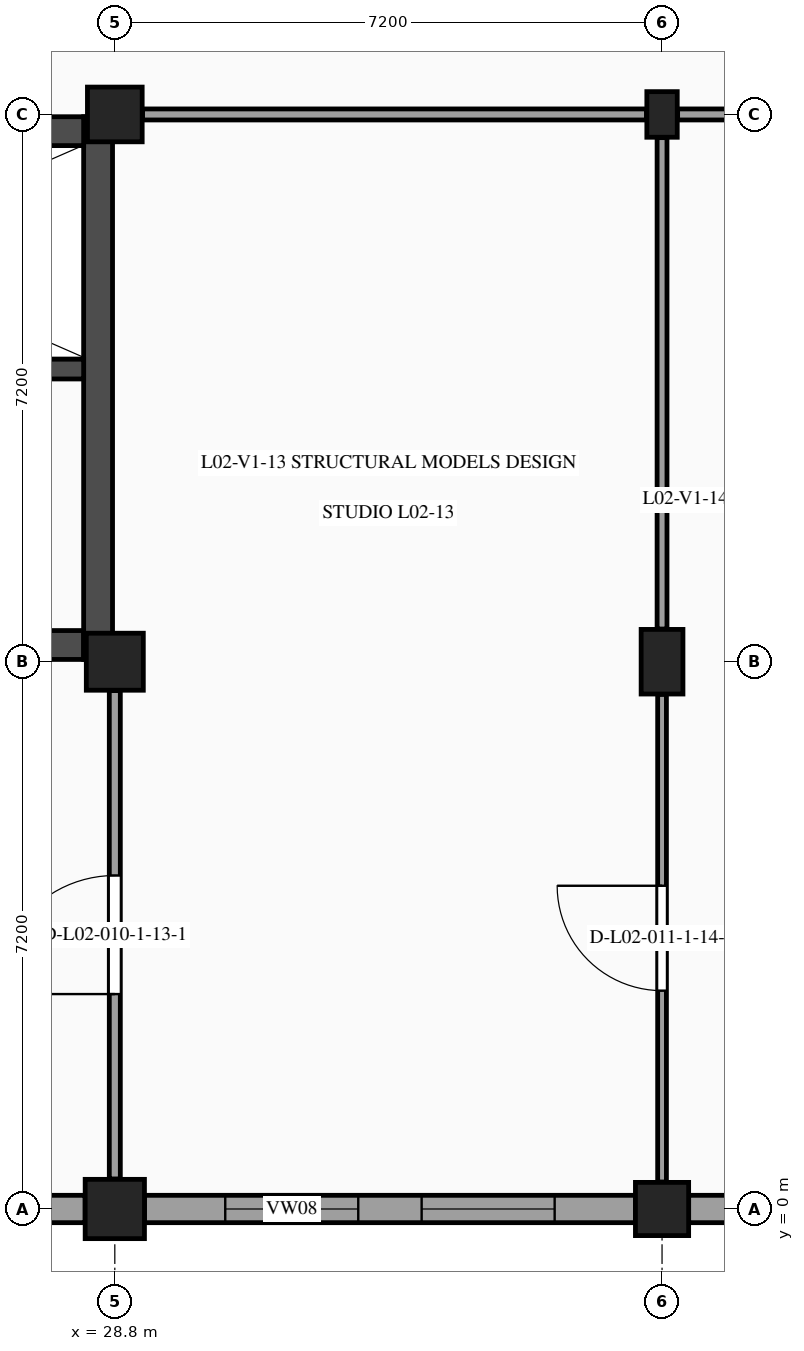
"""IFC4 building model, lengths in metres.
Left out: names, types, materials, properties, quantities, classifications, styles, units other than length and angle.
Written with IfcOpenShell. Run it as: python <this file> out.ifc"""

import sys

from ifc_helpers import new_model, si_unit, direction, frame, frame_2d, origin, origin_2d, place, context, subcontext, project, spatial, rectangle, extrude, element, fill, save


model = new_model("IFC4")
c1 = context("Model", 3, precision=1e-05, world=origin(), true_north=direction((0.0, 1.0)))
c2 = subcontext(c1, "Body", "Model", "MODEL_VIEW")
j1 = project(units=[si_unit("LENGTHUNIT", "METRE"), si_unit("PLANEANGLEUNIT", "RADIAN")], contexts=[c1])
p1 = place(None, origin())
s1 = spatial("IfcSite", under=j1, at=p1, CompositionType="ELEMENT")
p2 = place(p1, origin())
s2 = spatial("IfcBuilding", under=s1, at=p2, CompositionType="ELEMENT")
p3 = place(p2, frame((0.0, 0.0, 9.9)))
s3 = spatial("IfcBuildingStorey", under=s2, at=p3, CompositionType="ELEMENT", Elevation=9.9)
p4 = place(p3, frame((28.8, 0.0, 0.0), z_axis=(0.0, 0.0, 1.0), x_axis=(1.0, 0.0, 0.0)))
e1 = element("IfcColumn", 1, at=p4, inside=s3, PredefinedType="COLUMN", context=c2, shape_type="SweptSolid", body=[
    extrude(rectangle(XDim=0.78, YDim=0.78, at=origin_2d()), origin(), (0.0, 0.0, 1.0), 4.5),
])
p5 = place(p3, frame((28.8, 7.2, 0.0), z_axis=(0.0, 0.0, 1.0), x_axis=(1.0, 0.0, 0.0)))
e2 = element("IfcColumn", 2, at=p5, inside=s3, PredefinedType="COLUMN", context=c2, shape_type="SweptSolid", body=[
    extrude(rectangle(XDim=0.75, YDim=0.75, at=origin_2d()), origin(), (0.0, 0.0, 1.0), 4.5),
])
p6 = place(p3, frame((28.8, 14.4, 0.0), z_axis=(0.0, 0.0, 1.0), x_axis=(1.0, 0.0, 0.0)))
e3 = element("IfcColumn", 3, at=p6, inside=s3, PredefinedType="COLUMN", context=c2, shape_type="SweptSolid", body=[
    extrude(rectangle(XDim=0.72, YDim=0.72, at=origin_2d()), origin(), (0.0, 0.0, 1.0), 4.5),
])
p7 = place(p3, frame((36.0, 0.0, 0.0), z_axis=(0.0, 0.0, 1.0), x_axis=(1.0, 0.0, 0.0)))
e4 = element("IfcColumn", 4, at=p7, inside=s3, PredefinedType="COLUMN", context=c2, shape_type="SweptSolid", body=[
    extrude(rectangle(XDim=0.7, YDim=0.7, at=origin_2d()), origin(), (0.0, 0.0, 1.0), 4.5),
])
p8 = place(p3, frame((36.0, 7.2, 0.0), z_axis=(0.0, 0.0, 1.0), x_axis=(1.0, 0.0, 0.0)))
e5 = element("IfcColumn", 5, at=p8, inside=s3, PredefinedType="COLUMN", context=c2, shape_type="SweptSolid", body=[
    extrude(rectangle(XDim=0.55, YDim=0.85, at=origin_2d()), origin(), (0.0, 0.0, 1.0), 4.5),
])
p9 = place(p3, frame((36.0, 14.4, 0.0), z_axis=(0.0, 0.0, 1.0), x_axis=(1.0, 0.0, 0.0)))
e6 = element("IfcColumn", 6, at=p9, inside=s3, PredefinedType="PILASTER", context=c2, shape_type="SweptSolid", body=[
    extrude(rectangle(XDim=0.4, YDim=0.6, at=origin_2d()), origin(), (0.0, 0.0, 1.0), 4.5),
])
p10 = place(p3, frame((42.81, 0.0, 0.0), z_axis=(0.0, 0.0, 1.0), x_axis=(-1.0, 0.0, 0.0)))
e7 = element("IfcWall", 7, at=p10, inside=s3, PredefinedType="STANDARD", context=c2, shape_type="SweptSolid", body=[
    extrude(rectangle(XDim=6.46, YDim=0.36, at=frame_2d((3.23, 0.0))), origin(), (0.0, 0.0, 1.0), 3.46),
])
p11 = place(p10, frame((0.963, 0.0, 1.15)))
e8 = element("IfcOpeningElement", 8, at=p11, cuts=e7, PredefinedType="OPENING", context=c2, shape_type="SweptSolid", body=[
    extrude(rectangle(XDim=1.95, YDim=1.4, at=frame_2d((0.975, 0.7))), frame((0.0, 0.19, 0.0), z_axis=(0.0, -1.0, 0.0), x_axis=(1.0, 0.0, 0.0)), (0.0, 0.0, 1.0), 0.38),
])
p12 = place(p10, frame((3.547, 0.0, 1.15)))
e9 = element("IfcOpeningElement", 9, at=p12, cuts=e7, PredefinedType="OPENING", context=c2, shape_type="SweptSolid", body=[
    extrude(rectangle(XDim=1.95, YDim=1.4, at=frame_2d((0.975, 0.7))), frame((0.0, 0.19, 0.0), z_axis=(0.0, -1.0, 0.0), x_axis=(1.0, 0.0, 0.0)), (0.0, 0.0, 1.0), 0.38),
])
p13 = place(p3, frame((35.65, 0.0, 0.0), z_axis=(0.0, 0.0, 1.0), x_axis=(-1.0, 0.0, 0.0)))
e10 = element("IfcWall", 10, at=p13, inside=s3, PredefinedType="STANDARD", context=c2, shape_type="SweptSolid", body=[
    extrude(rectangle(XDim=6.46, YDim=0.36, at=frame_2d((3.23, 0.0))), origin(), (0.0, 0.0, 1.0), 3.47),
])
p14 = place(p13, frame((1.063, 0.0, 1.15)))
e11 = element("IfcOpeningElement", 11, at=p14, cuts=e10, PredefinedType="OPENING", context=c2, shape_type="SweptSolid", body=[
    extrude(rectangle(XDim=1.75, YDim=1.4, at=frame_2d((0.875, 0.7))), frame((0.0, 0.19, 0.0), z_axis=(0.0, -1.0, 0.0), x_axis=(1.0, 0.0, 0.0)), (0.0, 0.0, 1.0), 0.38),
])
p15 = place(p13, frame((3.647, 0.0, 1.15)))
e12 = element("IfcOpeningElement", 12, at=p15, cuts=e10, PredefinedType="OPENING", context=c2, shape_type="SweptSolid", body=[
    extrude(rectangle(XDim=1.75, YDim=1.4, at=frame_2d((0.875, 0.7))), frame((0.0, 0.19, 0.0), z_axis=(0.0, -1.0, 0.0), x_axis=(1.0, 0.0, 0.0)), (0.0, 0.0, 1.0), 0.38),
])
p16 = place(p3, frame((28.41, 0.0, 0.0), z_axis=(0.0, 0.0, 1.0), x_axis=(-1.0, 0.0, 0.0)))
e13 = element("IfcWall", 13, at=p16, inside=s3, PredefinedType="STANDARD", context=c2, shape_type="SweptSolid", body=[
    extrude(rectangle(XDim=6.46, YDim=0.36, at=frame_2d((3.23, 0.0))), origin(), (0.0, 0.0, 1.0), 3.47),
])
p17 = place(p16, frame((1.163, 0.0, 1.15)))
e14 = element("IfcOpeningElement", 14, at=p17, cuts=e13, PredefinedType="OPENING", context=c2, shape_type="SweptSolid", body=[
    extrude(rectangle(XDim=1.55, YDim=1.35, at=frame_2d((0.775, 0.675))), frame((0.0, 0.19, 0.0), z_axis=(0.0, -1.0, 0.0), x_axis=(1.0, 0.0, 0.0)), (0.0, 0.0, 1.0), 0.38),
])
p18 = place(p16, frame((3.747, 0.0, 1.15)))
e15 = element("IfcOpeningElement", 15, at=p18, cuts=e13, PredefinedType="OPENING", context=c2, shape_type="SweptSolid", body=[
    extrude(rectangle(XDim=1.55, YDim=1.35, at=frame_2d((0.775, 0.675))), frame((0.0, 0.19, 0.0), z_axis=(0.0, -1.0, 0.0), x_axis=(1.0, 0.0, 0.0)), (0.0, 0.0, 1.0), 0.38),
])
p19 = place(p3, frame((21.79, 7.42, 0.0), z_axis=(0.0, 0.0, 1.0), x_axis=(1.0, 0.0, 0.0)))
e16 = element("IfcWall", 16, at=p19, inside=s3, PredefinedType="SHEAR", context=c2, shape_type="SweptSolid", body=[
    extrude(rectangle(XDim=6.6, YDim=0.38, at=frame_2d((3.3, 0.0))), origin(), (0.0, 0.0, 1.0), 4.225),
])
p20 = place(p19, frame((2.22, 0.0, 0.0)))
e17 = element("IfcOpeningElement", 17, at=p20, cuts=e16, PredefinedType="OPENING", context=c2, shape_type="SweptSolid", body=[
    extrude(rectangle(XDim=1.8, YDim=2.2, at=frame_2d((0.9, 1.1))), frame((0.0, 0.2, 0.0), z_axis=(0.0, -1.0, 0.0), x_axis=(1.0, 0.0, 0.0)), (0.0, 0.0, 1.0), 0.4),
])
p21 = place(p3, frame((28.58, 7.23, 0.0), z_axis=(0.0, 0.0, 1.0), x_axis=(0.0, 1.0, 0.0)))
e18 = element("IfcWall", 18, at=p21, inside=s3, PredefinedType="SHEAR", context=c2, shape_type="SweptSolid", body=[
    extrude(rectangle(XDim=7.14, YDim=0.38, at=frame_2d((3.57, 0.0))), origin(), (0.0, 0.0, 1.0), 4.225),
])
p22 = place(p3, frame((21.79, 14.18, 0.0), z_axis=(0.0, 0.0, 1.0), x_axis=(1.0, 0.0, 0.0)))
e19 = element("IfcWall", 19, at=p22, inside=s3, PredefinedType="SHEAR", context=c2, shape_type="SweptSolid", body=[
    extrude(rectangle(XDim=6.6, YDim=0.38, at=frame_2d((3.3, 0.0))), origin(), (0.0, 0.0, 1.0), 4.225),
])
p23 = place(p3, frame((21.79, 11.05, 0.0), z_axis=(0.0, 0.0, 1.0), x_axis=(1.0, 0.0, 0.0)))
e20 = element("IfcWall", 20, at=p23, inside=s3, PredefinedType="SHEAR", context=c2, shape_type="SweptSolid", body=[
    extrude(rectangle(XDim=6.6, YDim=0.26, at=frame_2d((3.3, 0.0))), origin(), (0.0, 0.0, 1.0), 4.225),
])
p24 = place(p23, frame((0.95, 0.0, 0.0)))
e21 = element("IfcOpeningElement", 21, at=p24, cuts=e20, PredefinedType="OPENING", context=c2, shape_type="SweptSolid", body=[
    extrude(rectangle(XDim=1.1, YDim=2.2, at=frame_2d((0.55, 1.1))), frame((0.0, 0.14, 0.0), z_axis=(0.0, -1.0, 0.0), x_axis=(1.0, 0.0, 0.0)), (0.0, 0.0, 1.0), 0.28),
])
p25 = place(p23, frame((4.1, 0.0, 0.0)))
e22 = element("IfcOpeningElement", 22, at=p25, cuts=e20, PredefinedType="OPENING", context=c2, shape_type="SweptSolid", body=[
    extrude(rectangle(XDim=1.0, YDim=2.15, at=frame_2d((0.5, 1.075))), frame((0.0, 0.14, 0.0), z_axis=(0.0, -1.0, 0.0), x_axis=(1.0, 0.0, 0.0)), (0.0, 0.0, 1.0), 0.28),
])
p26 = place(p3, frame((28.8, 0.395, 0.0), z_axis=(0.0, 0.0, 1.0), x_axis=(0.0, 1.0, 0.0)))
e23 = element("IfcWall", 23, at=p26, inside=s3, PredefinedType="PARTITIONING", context=c2, shape_type="SweptSolid", body=[
    extrude(rectangle(XDim=6.425, YDim=0.145, at=frame_2d((3.212, 0.0))), origin(), (0.0, 0.0, 1.0), 3.54),
])
p27 = place(p26, frame((2.433, 0.0, 0.0)))
e24 = element("IfcOpeningElement", 24, at=p27, cuts=e23, PredefinedType="OPENING", context=c2, shape_type="SweptSolid", body=[
    extrude(rectangle(XDim=1.56, YDim=2.25, at=frame_2d((0.78, 1.125))), frame((0.0, 0.083, 0.0), z_axis=(0.0, -1.0, 0.0), x_axis=(1.0, 0.0, 0.0)), (0.0, 0.0, 1.0), 0.165),
])
p28 = place(p3, frame((36.0, 0.355, 0.0), z_axis=(0.0, 0.0, 1.0), x_axis=(0.0, 1.0, 0.0)))
e25 = element("IfcWall", 25, at=p28, inside=s3, PredefinedType="PARTITIONING", context=c2, shape_type="SweptSolid", body=[
    extrude(rectangle(XDim=6.415, YDim=0.115, at=frame_2d((3.208, 0.0))), origin(), (0.0, 0.0, 1.0), 3.53),
])
p29 = place(p28, frame((2.518, 0.0, 0.0)))
e26 = element("IfcOpeningElement", 26, at=p29, cuts=e25, PredefinedType="OPENING", context=c2, shape_type="SweptSolid", body=[
    extrude(rectangle(XDim=1.38, YDim=2.22, at=frame_2d((0.69, 1.11))), frame((0.0, 0.067, 0.0), z_axis=(0.0, -1.0, 0.0), x_axis=(1.0, 0.0, 0.0)), (0.0, 0.0, 1.0), 0.135),
])
p30 = place(p3, frame((36.0, 7.63, 0.0), z_axis=(0.0, 0.0, 1.0), x_axis=(0.0, 1.0, 0.0)))
e27 = element("IfcWall", 27, at=p30, inside=s3, PredefinedType="PARTITIONING", context=c2, shape_type="SweptSolid", body=[
    extrude(rectangle(XDim=6.465, YDim=0.13, at=frame_2d((3.232, 0.0))), origin(), (0.0, 0.0, 1.0), 3.525),
])
for number, where, z_axis, x_axis in (
    (28, (29.165, 14.4, 0.0), (0.0, 0.0, 1.0), (1.0, 0.0, 0.0)),
    (29, (36.205, 14.4, 0.0), (0.0, 0.0, 1.0), (1.0, 0.0, 0.0)),
):
    element("IfcWall", number, at=place(p3, frame(where, z_axis=z_axis, x_axis=x_axis)), inside=s3, PredefinedType="PARTITIONING", context=c2, shape_type="SweptSolid", body=[
        extrude(rectangle(XDim=6.63, YDim=0.145, at=frame_2d((3.315, 0.0))), origin(), (0.0, 0.0, 1.0), 3.565),
    ])
p31 = place(p14, origin())
e30 = element("IfcWindow", 30, at=p31, inside=s3, PartitioningType="SINGLE_PANEL", PredefinedType="WINDOW", context=c2, shape_type="SweptSolid", body=[
    extrude(rectangle(XDim=1.75, YDim=1.4, at=frame_2d((0.875, 0.7))), frame((0.0, -0.08, 0.0), z_axis=(0.0, -1.0, 0.0), x_axis=(1.0, 0.0, 0.0)), (0.0, 0.0, 1.0), 0.06),
])
fill(e11, e30)
p32 = place(p15, origin())
e31 = element("IfcWindow", 31, at=p32, inside=s3, PartitioningType="SINGLE_PANEL", PredefinedType="WINDOW", context=c2, shape_type="SweptSolid", body=[
    extrude(rectangle(XDim=1.75, YDim=1.4, at=frame_2d((0.875, 0.7))), frame((0.0, -0.08, 0.0), z_axis=(0.0, -1.0, 0.0), x_axis=(1.0, 0.0, 0.0)), (0.0, 0.0, 1.0), 0.06),
])
fill(e12, e31)
p33 = place(p27, origin())
e32 = element("IfcDoor", 32, at=p33, inside=s3, OperationType="SINGLE_SWING_LEFT", PredefinedType="DOOR", context=c2, shape_type="SweptSolid", body=[
    extrude(rectangle(XDim=1.56, YDim=2.25, at=frame_2d((0.78, 1.125))), frame((0.0, 0.025, 0.0), z_axis=(0.0, -1.0, 0.0), x_axis=(1.0, 0.0, 0.0)), (0.0, 0.0, 1.0), 0.05),
])
fill(e24, e32)
p34 = place(p29, origin())
e33 = element("IfcDoor", 33, at=p34, inside=s3, OperationType="SINGLE_SWING_RIGHT", PredefinedType="DOOR", context=c2, shape_type="SweptSolid", body=[
    extrude(rectangle(XDim=1.38, YDim=2.22, at=frame_2d((0.69, 1.11))), frame((0.0, 0.025, 0.0), z_axis=(0.0, -1.0, 0.0), x_axis=(1.0, 0.0, 0.0)), (0.0, 0.0, 1.0), 0.05),
])
fill(e26, e33)
save(model, sys.argv[1])
